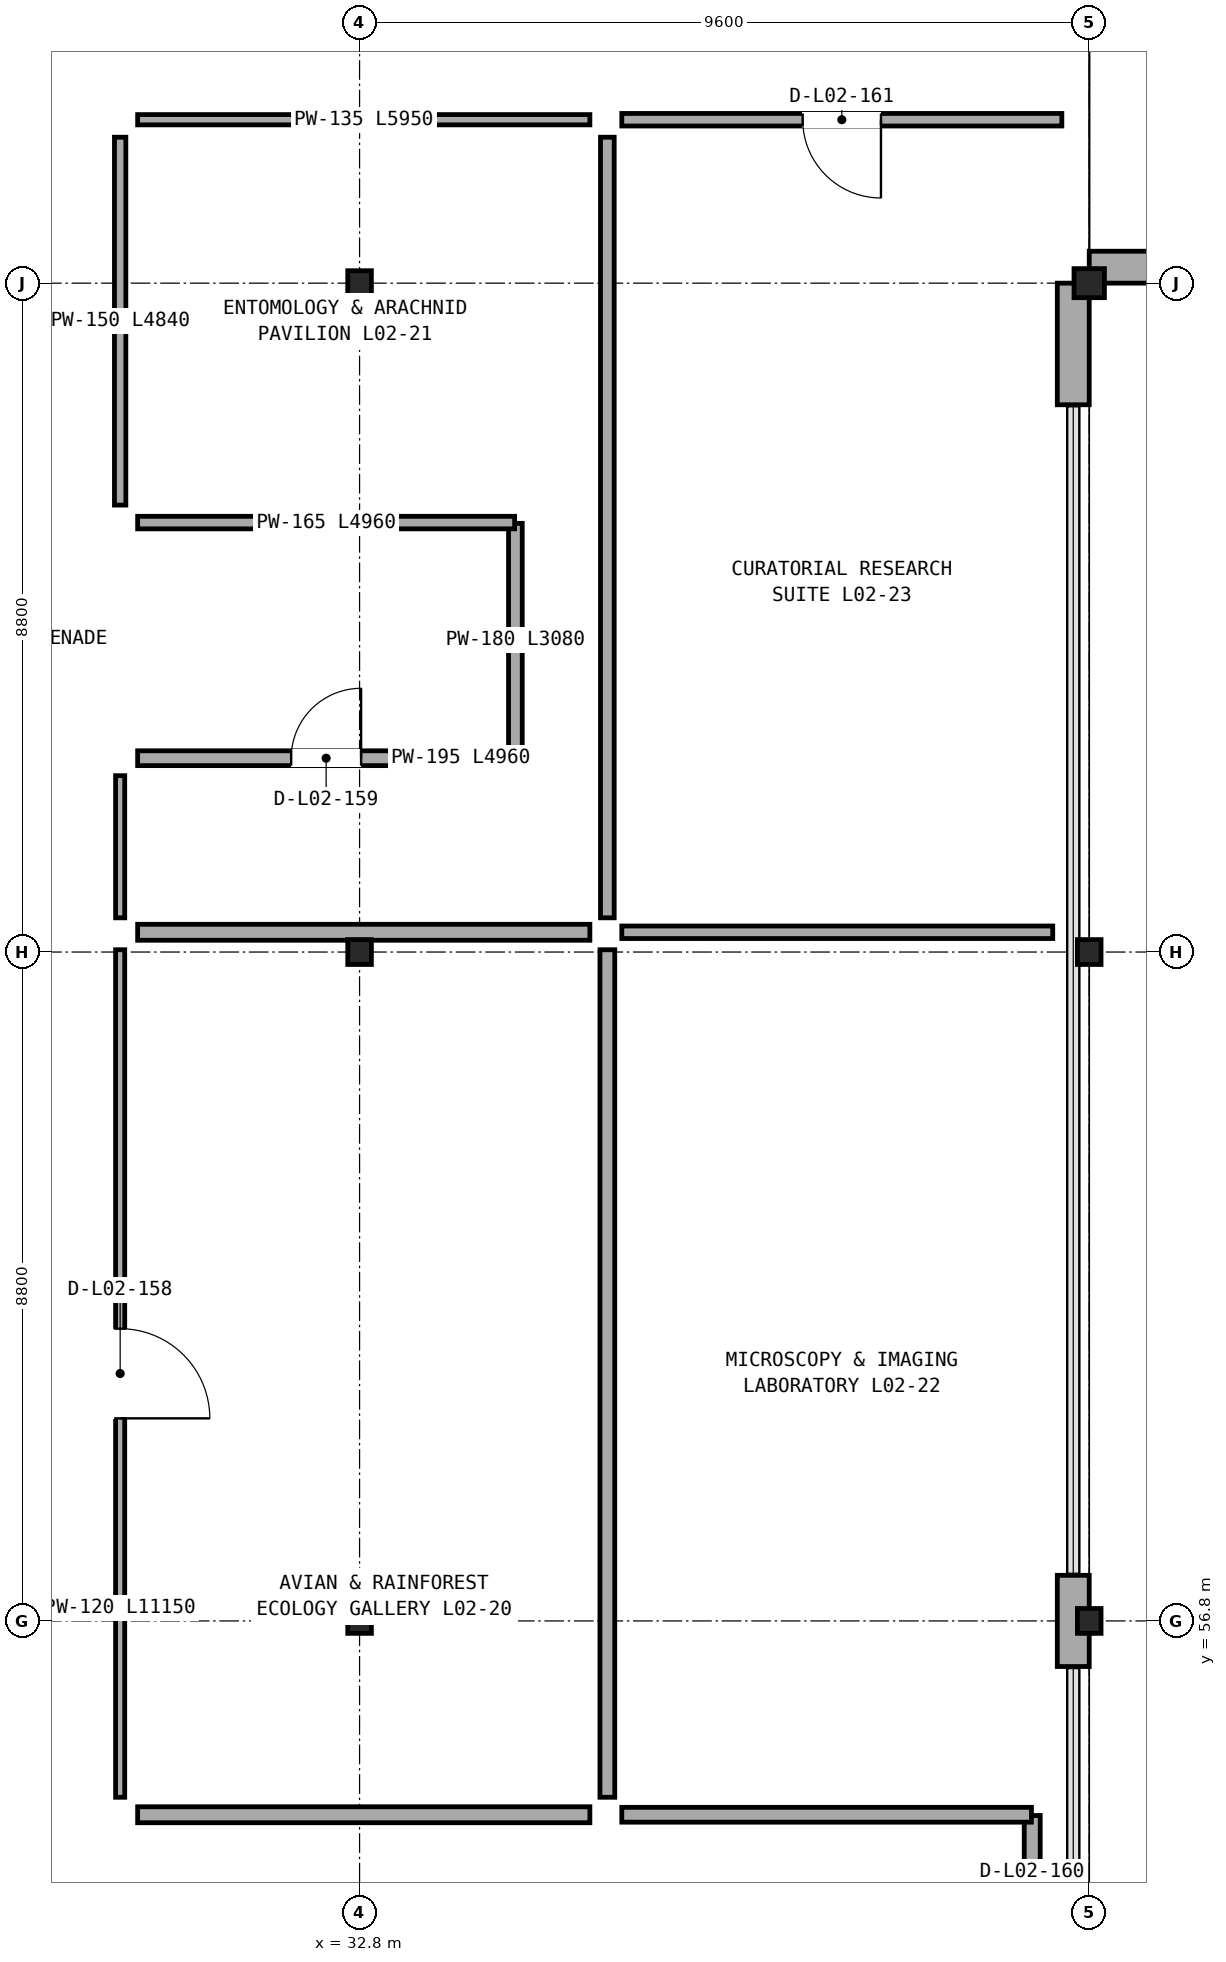
"""IFC4 building model, lengths in metres.
Left out: names, types, materials, properties, quantities, classifications, styles, units other than length and angle.
Written with IfcOpenShell. Run it as: python <this file> out.ifc"""

import sys

from ifc_helpers import new_model, si_unit, direction, frame, frame_2d, origin, origin_2d, place, context, subcontext, project, spatial, rectangle, i_section, extrude, element, fill, save


model = new_model("IFC4")
c1 = context("Model", 3, precision=1e-05, world=origin(), true_north=direction((0.0, 1.0)))
c2 = subcontext(c1, "Body", "Model", "MODEL_VIEW")
j1 = project(units=[si_unit("LENGTHUNIT", "METRE"), si_unit("PLANEANGLEUNIT", "RADIAN")], contexts=[c1])
p1 = place(None, origin())
s1 = spatial("IfcSite", under=j1, at=p1, CompositionType="ELEMENT")
p2 = place(p1, origin())
s2 = spatial("IfcBuilding", under=s1, at=p2, CompositionType="ELEMENT")
p3 = place(p2, frame((0.0, 0.0, 10.1)))
s3 = spatial("IfcBuildingStorey", under=s2, at=p3, CompositionType="ELEMENT", Elevation=10.1)
for number, where, z_axis, x_axis in (
    (1, (32.8, 56.8, 0.0), (0.0, 0.0, 1.0), (1.0, 0.0, 0.0)),
    (2, (32.8, 65.6, 0.0), (0.0, 0.0, 1.0), (1.0, 0.0, 0.0)),
    (3, (32.8, 74.4, 0.0), (0.0, 0.0, 1.0), (1.0, 0.0, 0.0)),
    (4, (42.4, 56.8, 0.0), (0.0, 0.0, 1.0), (1.0, 0.0, 0.0)),
    (5, (42.4, 65.6, 0.0), (0.0, 0.0, 1.0), (1.0, 0.0, 0.0)),
):
    element("IfcColumn", number, at=place(p3, frame(where, z_axis=z_axis, x_axis=x_axis)), inside=s3, PredefinedType="COLUMN", context=c2, shape_type="SweptSolid", body=[
        extrude(i_section(OverallWidth=0.311, OverallDepth=0.327, WebThickness=0.016, FlangeThickness=0.025, FilletRadius=0.017, at=origin_2d()), origin(), (0.0, 0.0, 1.0), 4.5),
    ])
p4 = place(p3, frame((42.4, 74.4, 0.0), z_axis=(0.0, 0.0, 1.0), x_axis=(1.0, 0.0, 0.0)))
e6 = element("IfcColumn", 6, at=p4, inside=s3, PredefinedType="COLUMN", context=c2, shape_type="SweptSolid", body=[
    extrude(i_section(OverallWidth=0.4, OverallDepth=0.382, WebThickness=0.025, FlangeThickness=0.036, at=origin_2d()), origin(), (0.0, 0.0, 1.0), 4.5),
])
p5 = place(p3, frame((42.19, 56.2, 0.0), z_axis=(0.0, 0.0, 1.0), x_axis=(0.0, 1.0, 0.0)))
e7 = element("IfcWall", 7, at=p5, inside=s3, PredefinedType="SOLIDWALL", context=c2, shape_type="SweptSolid", body=[
    extrude(rectangle(XDim=1.2, YDim=0.42, at=frame_2d((0.6, 0.0))), origin(), (0.0, 0.0, 1.0), 3.598),
])
p6 = place(p3, frame((42.19, 72.8, 0.0), z_axis=(0.0, 0.0, 1.0), x_axis=(0.0, 1.0, 0.0)))
e8 = element("IfcWall", 8, at=p6, inside=s3, PredefinedType="SOLIDWALL", context=c2, shape_type="SweptSolid", body=[
    extrude(rectangle(XDim=1.6, YDim=0.42, at=frame_2d((0.8, 0.0))), origin(), (0.0, 0.0, 1.0), 3.598),
])
p7 = place(p3, frame((42.4, 74.61, 0.0), z_axis=(0.0, 0.0, 1.0), x_axis=(1.0, 0.0, 0.0)))
e9 = element("IfcWall", 9, at=p7, inside=s3, PredefinedType="SOLIDWALL", context=c2, shape_type="SweptSolid", body=[
    extrude(rectangle(XDim=38.4, YDim=0.42, at=frame_2d((19.2, 0.0))), origin(), (0.0, 0.0, 1.0), 3.588),
])
p8 = place(p7, frame((1.8, 0.0, 0.9)))
e10 = element("IfcOpeningElement", 10, at=p8, cuts=e9, PredefinedType="OPENING", context=c2, shape_type="SweptSolid", body=[
    extrude(rectangle(XDim=2.2, YDim=2.15, at=frame_2d((1.1, 1.075))), frame((0.0, 0.22, 0.0), z_axis=(0.0, -1.0, 0.0), x_axis=(1.0, 0.0, 0.0)), (0.0, 0.0, 1.0), 0.44),
])
p9 = place(p7, frame((6.4, 0.0, 0.9)))
e11 = element("IfcOpeningElement", 11, at=p9, cuts=e9, PredefinedType="OPENING", context=c2, shape_type="SweptSolid", body=[
    extrude(rectangle(XDim=2.52, YDim=2.15, at=frame_2d((1.26, 1.075))), frame((0.0, 0.22, 0.0), z_axis=(0.0, -1.0, 0.0), x_axis=(1.0, 0.0, 0.0)), (0.0, 0.0, 1.0), 0.44),
])
p10 = place(p7, frame((11.0, 0.0, 0.9)))
e12 = element("IfcOpeningElement", 12, at=p10, cuts=e9, PredefinedType="OPENING", context=c2, shape_type="SweptSolid", body=[
    extrude(rectangle(XDim=2.65, YDim=2.15, at=frame_2d((1.325, 1.075))), frame((0.0, 0.22, 0.0), z_axis=(0.0, -1.0, 0.0), x_axis=(1.0, 0.0, 0.0)), (0.0, 0.0, 1.0), 0.44),
])
p11 = place(p7, frame((15.6, 0.0, 0.75)))
e13 = element("IfcOpeningElement", 13, at=p11, cuts=e9, PredefinedType="OPENING", context=c2, shape_type="SweptSolid", body=[
    extrude(rectangle(XDim=0.95, YDim=2.5, at=frame_2d((0.475, 1.25))), frame((0.0, 0.22, 0.0), z_axis=(0.0, -1.0, 0.0), x_axis=(1.0, 0.0, 0.0)), (0.0, 0.0, 1.0), 0.44),
])
p12 = place(p7, frame((20.2, 0.0, 0.75)))
e14 = element("IfcOpeningElement", 14, at=p12, cuts=e9, PredefinedType="OPENING", context=c2, shape_type="SweptSolid", body=[
    extrude(rectangle(XDim=1.1, YDim=2.5, at=frame_2d((0.55, 1.25))), frame((0.0, 0.22, 0.0), z_axis=(0.0, -1.0, 0.0), x_axis=(1.0, 0.0, 0.0)), (0.0, 0.0, 1.0), 0.44),
])
p13 = place(p7, frame((24.8, 0.0, 0.75)))
e15 = element("IfcOpeningElement", 15, at=p13, cuts=e9, PredefinedType="OPENING", context=c2, shape_type="SweptSolid", body=[
    extrude(rectangle(XDim=1.25, YDim=2.5, at=frame_2d((0.625, 1.25))), frame((0.0, 0.22, 0.0), z_axis=(0.0, -1.0, 0.0), x_axis=(1.0, 0.0, 0.0)), (0.0, 0.0, 1.0), 0.44),
])
p14 = place(p3, frame((29.65, 54.48, 0.0), z_axis=(0.0, 0.0, 1.0), x_axis=(0.0, 1.0, 0.0)))
e16 = element("IfcWall", 16, at=p14, inside=s3, PredefinedType="PARTITIONING", context=c2, shape_type="SweptSolid", body=[
    extrude(rectangle(XDim=11.15, YDim=0.12, at=frame_2d((5.575, 0.0))), origin(), (0.0, 0.0, 1.0), 3.19),
])
p15 = place(p14, frame((4.985, 0.0, 0.0)))
e17 = element("IfcOpeningElement", 17, at=p15, cuts=e16, PredefinedType="OPENING", context=c2, shape_type="SweptSolid", body=[
    extrude(rectangle(XDim=1.18, YDim=2.08, at=frame_2d((0.59, 1.04))), frame((0.0, 0.07, 0.0), z_axis=(0.0, -1.0, 0.0), x_axis=(1.0, 0.0, 0.0)), (0.0, 0.0, 1.0), 0.14),
])
p16 = place(p3, frame((35.83, 54.25, 0.0), z_axis=(0.0, 0.0, 1.0), x_axis=(-1.0, 0.0, 0.0)))
e18 = element("IfcWall", 18, at=p16, inside=s3, PredefinedType="PARTITIONING", context=c2, shape_type="SweptSolid", body=[
    extrude(rectangle(XDim=5.95, YDim=0.21, at=frame_2d((2.975, 0.0))), origin(), (0.0, 0.0, 1.0), 3.733),
])
p17 = place(p3, frame((29.88, 68.15, 0.0), z_axis=(0.0, 0.0, 1.0), x_axis=(1.0, 0.0, 0.0)))
e19 = element("IfcWall", 19, at=p17, inside=s3, PredefinedType="PARTITIONING", context=c2, shape_type="SweptSolid", body=[
    extrude(rectangle(XDim=4.96, YDim=0.195, at=frame_2d((2.48, 0.0))), origin(), (0.0, 0.0, 1.0), 3.733),
])
p18 = place(p17, frame((2.02, 0.0, 0.0)))
e20 = element("IfcOpeningElement", 20, at=p18, cuts=e19, PredefinedType="OPENING", context=c2, shape_type="SweptSolid", body=[
    extrude(rectangle(XDim=0.92, YDim=2.16, at=frame_2d((0.46, 1.08))), frame((0.0, 0.107, 0.0), z_axis=(0.0, -1.0, 0.0), x_axis=(1.0, 0.0, 0.0)), (0.0, 0.0, 1.0), 0.215),
])
p19 = place(p3, frame((34.85, 68.16, 0.0), z_axis=(0.0, 0.0, 1.0), x_axis=(0.0, 1.0, 0.0)))
e21 = element("IfcWall", 21, at=p19, inside=s3, PredefinedType="PARTITIONING", context=c2, shape_type="SweptSolid", body=[
    extrude(rectangle(XDim=3.08, YDim=0.18, at=frame_2d((1.54, 0.0))), origin(), (0.0, 0.0, 1.0), 4.13),
])
p20 = place(p3, frame((34.84, 71.25, 0.0), z_axis=(0.0, 0.0, 1.0), x_axis=(-1.0, 0.0, 0.0)))
e22 = element("IfcWall", 22, at=p20, inside=s3, PredefinedType="PARTITIONING", context=c2, shape_type="SweptSolid", body=[
    extrude(rectangle(XDim=4.96, YDim=0.165, at=frame_2d((2.48, 0.0))), origin(), (0.0, 0.0, 1.0), 3.733),
])
p21 = place(p3, frame((29.65, 71.48, 0.0), z_axis=(0.0, 0.0, 1.0), x_axis=(0.0, 1.0, 0.0)))
e23 = element("IfcWall", 23, at=p21, inside=s3, PredefinedType="PARTITIONING", context=c2, shape_type="SweptSolid", body=[
    extrude(rectangle(XDim=4.84, YDim=0.15, at=frame_2d((2.42, 0.0))), origin(), (0.0, 0.0, 1.0), 3.19),
])
p22 = place(p3, frame((29.88, 76.55, 0.0), z_axis=(0.0, 0.0, 1.0), x_axis=(1.0, 0.0, 0.0)))
e24 = element("IfcWall", 24, at=p22, inside=s3, PredefinedType="PARTITIONING", context=c2, shape_type="SweptSolid", body=[
    extrude(rectangle(XDim=5.95, YDim=0.135, at=frame_2d((2.975, 0.0))), origin(), (0.0, 0.0, 1.0), 3.733),
])
p23 = place(p3, frame((29.65, 66.05, 0.0), z_axis=(0.0, 0.0, 1.0), x_axis=(0.0, 1.0, 0.0)))
e25 = element("IfcWall", 25, at=p23, inside=s3, PredefinedType="PARTITIONING", context=c2, shape_type="SweptSolid", body=[
    extrude(rectangle(XDim=1.87, YDim=0.12, at=frame_2d((0.935, 0.0))), origin(), (0.0, 0.0, 1.0), 4.13),
])
p24 = place(p3, frame((41.65, 51.16, 0.0), z_axis=(0.0, 0.0, 1.0), x_axis=(0.0, 1.0, 0.0)))
e26 = element("IfcWall", 26, at=p24, inside=s3, PredefinedType="PARTITIONING", context=c2, shape_type="SweptSolid", body=[
    extrude(rectangle(XDim=3.08, YDim=0.21, at=frame_2d((1.54, 0.0))), origin(), (0.0, 0.0, 1.0), 4.13),
])
p25 = place(p24, frame((1.055, 0.0, 0.0)))
e27 = element("IfcOpeningElement", 27, at=p25, cuts=e26, PredefinedType="OPENING", context=c2, shape_type="SweptSolid", body=[
    extrude(rectangle(XDim=0.97, YDim=2.16, at=frame_2d((0.485, 1.08))), frame((0.0, 0.115, 0.0), z_axis=(0.0, -1.0, 0.0), x_axis=(1.0, 0.0, 0.0)), (0.0, 0.0, 1.0), 0.23),
])
p26 = place(p3, frame((41.64, 54.25, 0.0), z_axis=(0.0, 0.0, 1.0), x_axis=(-1.0, 0.0, 0.0)))
e28 = element("IfcWall", 28, at=p26, inside=s3, PredefinedType="PARTITIONING", context=c2, shape_type="SweptSolid", body=[
    extrude(rectangle(XDim=5.39, YDim=0.195, at=frame_2d((2.695, 0.0))), origin(), (0.0, 0.0, 1.0), 3.883),
])
p27 = place(p3, frame((36.25, 76.55, 0.0), z_axis=(0.0, 0.0, 1.0), x_axis=(1.0, 0.0, 0.0)))
e29 = element("IfcWall", 29, at=p27, inside=s3, PredefinedType="PARTITIONING", context=c2, shape_type="SweptSolid", body=[
    extrude(rectangle(XDim=5.79, YDim=0.165, at=frame_2d((2.895, 0.0))), origin(), (0.0, 0.0, 1.0), 3.983),
])
p28 = place(p27, frame((2.38, 0.0, 0.0)))
e30 = element("IfcOpeningElement", 30, at=p28, cuts=e29, PredefinedType="OPENING", context=c2, shape_type="SweptSolid", body=[
    extrude(rectangle(XDim=1.03, YDim=2.16, at=frame_2d((0.515, 1.08))), frame((0.0, 0.093, 0.0), z_axis=(0.0, -1.0, 0.0), x_axis=(1.0, 0.0, 0.0)), (0.0, 0.0, 1.0), 0.185),
])
p29 = place(p3, frame((29.88, 65.86, 0.0), z_axis=(0.0, 0.0, 1.0), x_axis=(1.0, 0.0, 0.0)))
e31 = element("IfcWall", 31, at=p29, inside=s3, PredefinedType="PARTITIONING", context=c2, shape_type="SweptSolid", body=[
    extrude(rectangle(XDim=5.95, YDim=0.21, at=frame_2d((2.975, 0.0))), origin(), (0.0, 0.0, 1.0), 3.19),
])
p30 = place(p3, frame((36.06, 65.63, 0.0), z_axis=(0.0, 0.0, 1.0), x_axis=(0.0, -1.0, 0.0)))
e32 = element("IfcWall", 32, at=p30, inside=s3, PredefinedType="PARTITIONING", context=c2, shape_type="SweptSolid", body=[
    extrude(rectangle(XDim=11.15, YDim=0.195, at=frame_2d((5.575, 0.0))), origin(), (0.0, 0.0, 1.0), 3.583),
])
p31 = place(p3, frame((36.06, 76.32, 0.0), z_axis=(0.0, 0.0, 1.0), x_axis=(0.0, -1.0, 0.0)))
e33 = element("IfcWall", 33, at=p31, inside=s3, PredefinedType="PARTITIONING", context=c2, shape_type="SweptSolid", body=[
    extrude(rectangle(XDim=10.27, YDim=0.18, at=frame_2d((5.135, 0.0))), origin(), (0.0, 0.0, 1.0), 3.583),
])
p32 = place(p3, frame((36.25, 65.86, 0.0), z_axis=(0.0, 0.0, 1.0), x_axis=(1.0, 0.0, 0.0)))
e34 = element("IfcWall", 34, at=p32, inside=s3, PredefinedType="PARTITIONING", context=c2, shape_type="SweptSolid", body=[
    extrude(rectangle(XDim=5.67, YDim=0.165, at=frame_2d((2.835, 0.0))), origin(), (0.0, 0.0, 1.0), 2.9),
])
p33 = place(p15, frame((1.18, 0.0, 0.0), z_axis=(0.0, 0.0, 1.0), x_axis=(-1.0, 0.0, 0.0)))
e35 = element("IfcDoor", 35, at=p33, inside=s3, OperationType="SINGLE_SWING_LEFT", PredefinedType="DOOR", context=c2, shape_type="SweptSolid", body=[
    extrude(rectangle(XDim=1.18, YDim=2.08, at=frame_2d((0.59, 1.04))), frame((0.0, 0.025, 0.0), z_axis=(0.0, -1.0, 0.0), x_axis=(1.0, 0.0, 0.0)), (0.0, 0.0, 1.0), 0.05),
])
fill(e17, e35)
p34 = place(p18, origin())
e36 = element("IfcDoor", 36, at=p34, inside=s3, OperationType="SINGLE_SWING_RIGHT", PredefinedType="DOOR", context=c2, shape_type="SweptSolid", body=[
    extrude(rectangle(XDim=0.92, YDim=2.16, at=frame_2d((0.46, 1.08))), frame((0.0, 0.025, 0.0), z_axis=(0.0, -1.0, 0.0), x_axis=(1.0, 0.0, 0.0)), (0.0, 0.0, 1.0), 0.05),
])
fill(e20, e36)
p35 = place(p28, frame((1.03, 0.0, 0.0), z_axis=(0.0, 0.0, 1.0), x_axis=(-1.0, 0.0, 0.0)))
e37 = element("IfcDoor", 37, at=p35, inside=s3, OperationType="SINGLE_SWING_RIGHT", PredefinedType="DOOR", context=c2, shape_type="SweptSolid", body=[
    extrude(rectangle(XDim=1.03, YDim=2.16, at=frame_2d((0.515, 1.08))), frame((0.0, 0.025, 0.0), z_axis=(0.0, -1.0, 0.0), x_axis=(1.0, 0.0, 0.0)), (0.0, 0.0, 1.0), 0.05),
])
fill(e30, e37)
save(model, sys.argv[1])
